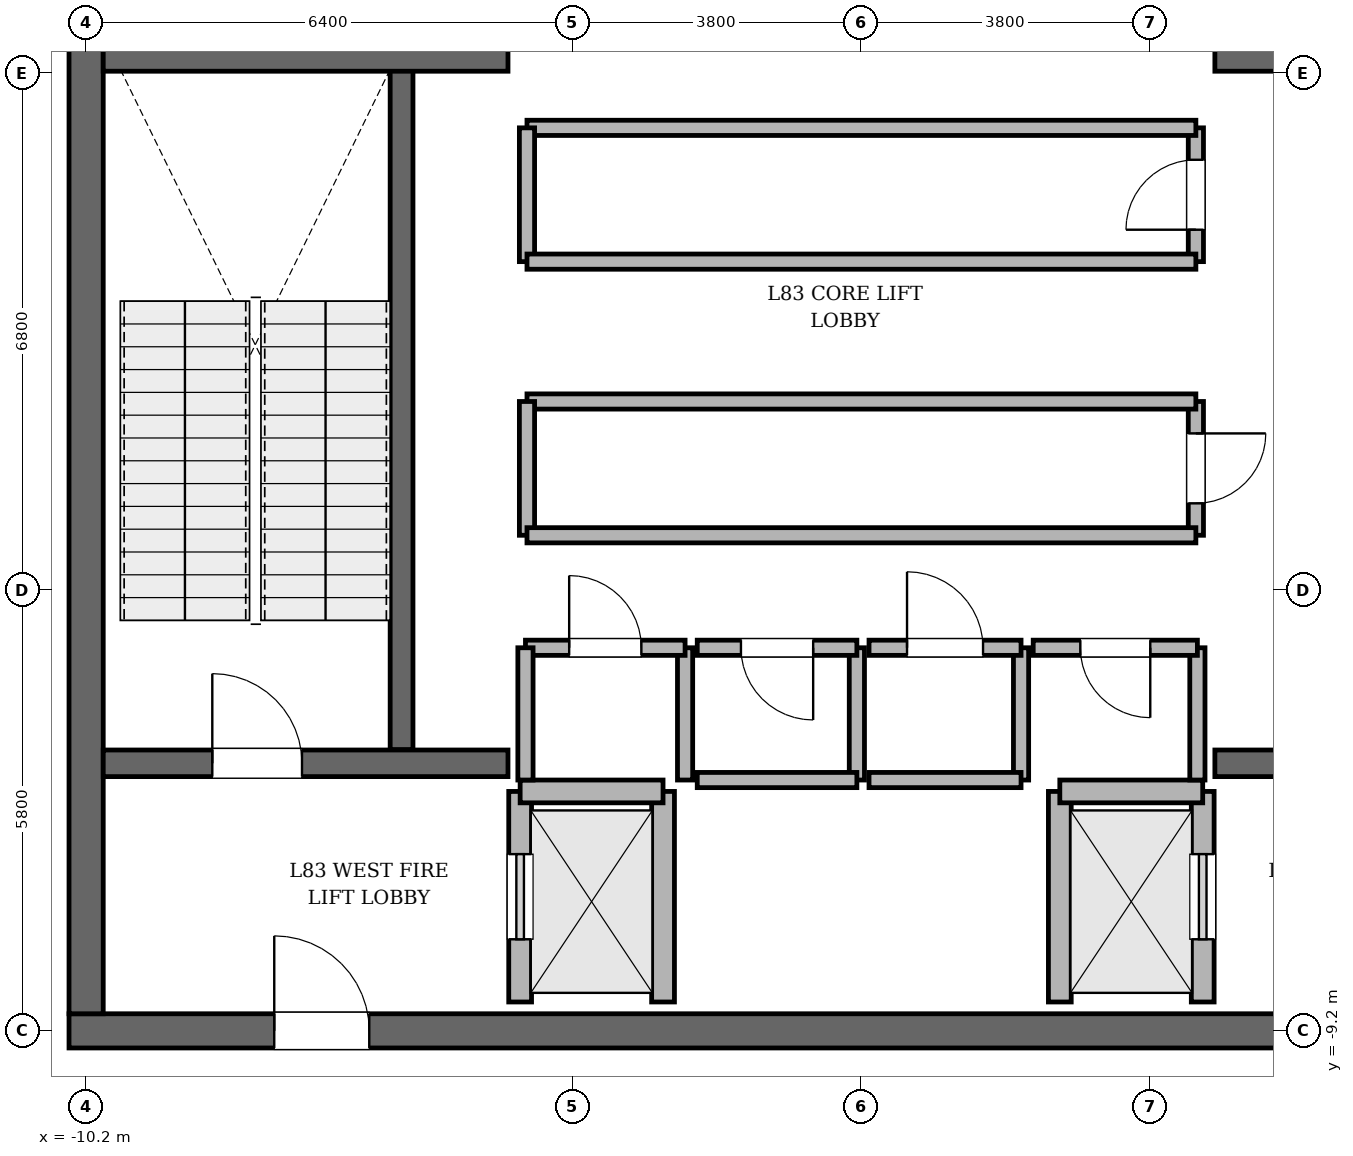
"""IFC4 building model, lengths in metres.
Left out: names, types, materials, properties, quantities, classifications, styles, units other than length and angle.
Written with IfcOpenShell. Run it as: python <this file> out.ifc"""

import sys

from ifc_helpers import new_model, si_unit, direction, frame, frame_2d, origin, place, context, subcontext, project, spatial, rectangle, extrude, element, fill, save


model = new_model("IFC4")
c1 = context("Model", 3, precision=1e-05, world=origin(), true_north=direction((0.0, 1.0)))
c2 = subcontext(c1, "Body", "Model", "MODEL_VIEW")
j1 = project(units=[si_unit("LENGTHUNIT", "METRE"), si_unit("PLANEANGLEUNIT", "RADIAN")], contexts=[c1])
p1 = place(None, origin())
s1 = spatial("IfcSite", under=j1, at=p1, CompositionType="ELEMENT")
p2 = place(p1, origin())
s2 = spatial("IfcBuilding", under=s1, at=p2, CompositionType="ELEMENT")
p3 = place(p2, frame((0.0, 0.0, 352.8)))
s3 = spatial("IfcBuildingStorey", under=s2, at=p3, CompositionType="ELEMENT", Elevation=352.8)
p4 = place(p3, frame((10.425, -9.2, 0.0), z_axis=(0.0, 0.0, 1.0), x_axis=(-1.0, 0.0, 0.0)))
e1 = element("IfcWall", 1, at=p4, inside=s3, PredefinedType="SHEAR", context=c2, shape_type="SweptSolid", body=[
    extrude(rectangle(XDim=20.85, YDim=0.45, at=frame_2d((10.425, 0.0))), origin(), (0.0, 0.0, 1.0), 4.5),
])
p5 = place(p4, frame((2.7, 0.0, 0.0)))
e2 = element("IfcOpeningElement", 2, at=p5, cuts=e1, PredefinedType="OPENING", context=c2, shape_type="SweptSolid", body=[
    extrude(rectangle(XDim=1.25, YDim=2.25, at=frame_2d((0.625, 1.125))), frame((0.0, 0.235, 0.0), z_axis=(0.0, -1.0, 0.0), x_axis=(1.0, 0.0, 0.0)), (0.0, 0.0, 1.0), 0.47),
])
p6 = place(p4, frame((16.9, 0.0, 0.0)))
e3 = element("IfcOpeningElement", 3, at=p6, cuts=e1, PredefinedType="OPENING", context=c2, shape_type="SweptSolid", body=[
    extrude(rectangle(XDim=1.25, YDim=2.25, at=frame_2d((0.625, 1.125))), frame((0.0, 0.235, 0.0), z_axis=(0.0, -1.0, 0.0), x_axis=(1.0, 0.0, 0.0)), (0.0, 0.0, 1.0), 0.47),
])
p7 = place(p3, frame((-10.2, -8.975, 0.0), z_axis=(0.0, 0.0, 1.0), x_axis=(0.0, 1.0, 0.0)))
e4 = element("IfcWall", 4, at=p7, inside=s3, PredefinedType="SHEAR", context=c2, shape_type="SweptSolid", body=[
    extrude(rectangle(XDim=17.95, YDim=0.45, at=frame_2d((8.975, 0.0))), origin(), (0.0, 0.0, 1.0), 4.5),
])
p8 = place(p7, frame((12.765, 0.0, 0.0)))
e5 = element("IfcOpeningElement", 5, at=p8, cuts=e4, PredefinedType="OPENING", context=c2, shape_type="SweptSolid", body=[
    extrude(rectangle(XDim=1.18, YDim=2.2, at=frame_2d((0.59, 1.1))), frame((0.0, 0.235, 0.0), z_axis=(0.0, -1.0, 0.0), x_axis=(1.0, 0.0, 0.0)), (0.0, 0.0, 1.0), 0.47),
])
p9 = place(p3, frame((-6.05, -5.5, 0.0), z_axis=(0.0, 0.0, 1.0), x_axis=(0.0, 1.0, 0.0)))
e6 = element("IfcWall", 6, at=p9, inside=s3, PredefinedType="SOLIDWALL", context=c2, shape_type="SweptSolid", body=[
    extrude(rectangle(XDim=8.95, YDim=0.3, at=frame_2d((4.475, 0.0))), origin(), (0.0, 0.0, 1.0), 4.5),
])
p10 = place(p3, frame((-9.975, -5.68, 0.0), z_axis=(0.0, 0.0, 1.0), x_axis=(1.0, 0.0, 0.0)))
e7 = element("IfcWall", 7, at=p10, inside=s3, PredefinedType="SOLIDWALL", context=c2, shape_type="SweptSolid", body=[
    extrude(rectangle(XDim=5.325, YDim=0.35, at=frame_2d((2.663, 0.0))), origin(), (0.0, 0.0, 1.0), 4.5),
])
p11 = place(p10, frame((1.435, 0.0, 0.0)))
e8 = element("IfcOpeningElement", 8, at=p11, cuts=e7, PredefinedType="OPENING", context=c2, shape_type="SweptSolid", body=[
    extrude(rectangle(XDim=1.18, YDim=2.2, at=frame_2d((0.59, 1.1))), frame((0.0, 0.185, 0.0), z_axis=(0.0, -1.0, 0.0), x_axis=(1.0, 0.0, 0.0)), (0.0, 0.0, 1.0), 0.37),
])
p12 = place(p3, frame((4.65, -5.68, 0.0), z_axis=(0.0, 0.0, 1.0), x_axis=(1.0, 0.0, 0.0)))
e9 = element("IfcWall", 9, at=p12, inside=s3, PredefinedType="SOLIDWALL", context=c2, shape_type="SweptSolid", body=[
    extrude(rectangle(XDim=5.325, YDim=0.35, at=frame_2d((2.663, 0.0))), origin(), (0.0, 0.0, 1.0), 4.5),
])
p13 = place(p12, frame((2.71, 0.0, 0.0)))
e10 = element("IfcOpeningElement", 10, at=p13, cuts=e9, PredefinedType="OPENING", context=c2, shape_type="SweptSolid", body=[
    extrude(rectangle(XDim=1.18, YDim=2.2, at=frame_2d((0.59, 1.1))), frame((0.0, 0.185, 0.0), z_axis=(0.0, -1.0, 0.0), x_axis=(1.0, 0.0, 0.0)), (0.0, 0.0, 1.0), 0.37),
])
for number, where, z_axis, x_axis in (
    (11, (-9.975, 3.6, 0.0), (0.0, 0.0, 1.0), (1.0, 0.0, 0.0)),
    (12, (4.65, 3.6, 0.0), (0.0, 0.0, 1.0), (1.0, 0.0, 0.0)),
):
    element("IfcWall", number, at=place(p3, frame(where, z_axis=z_axis, x_axis=x_axis)), inside=s3, PredefinedType="SOLIDWALL", context=c2, shape_type="SweptSolid", body=[
        extrude(rectangle(XDim=5.325, YDim=0.35, at=frame_2d((2.663, 0.0))), origin(), (0.0, 0.0, 1.0), 4.5),
    ])
p14 = place(p3, frame((-4.49, -8.82, 0.0), z_axis=(0.0, 0.0, 1.0), x_axis=(0.0, 1.0, 0.0)))
e13 = element("IfcWall", 13, at=p14, inside=s3, PredefinedType="SOLIDWALL", context=c2, shape_type="SweptSolid", body=[
    extrude(rectangle(XDim=2.77, YDim=0.3, at=frame_2d((1.385, 0.0))), origin(), (0.0, 0.0, 1.0), 4.28),
])
p15 = place(p14, frame((0.825, 0.0, 0.0)))
e14 = element("IfcOpeningElement", 14, at=p15, cuts=e13, PredefinedType="OPENING", context=c2, shape_type="SweptSolid", body=[
    extrude(rectangle(XDim=1.12, YDim=2.25, at=frame_2d((0.56, 1.125))), frame((0.0, 0.16, 0.0), z_axis=(0.0, -1.0, 0.0), x_axis=(1.0, 0.0, 0.0)), (0.0, 0.0, 1.0), 0.32),
])
p16 = place(p3, frame((-2.61, -8.82, 0.0), z_axis=(0.0, 0.0, 1.0), x_axis=(0.0, 1.0, 0.0)))
e15 = element("IfcWall", 15, at=p16, inside=s3, PredefinedType="SOLIDWALL", context=c2, shape_type="SweptSolid", body=[
    extrude(rectangle(XDim=2.77, YDim=0.3, at=frame_2d((1.385, 0.0))), origin(), (0.0, 0.0, 1.0), 4.28),
])
p17 = place(p3, frame((-4.49, -6.05, 0.0), z_axis=(0.0, 0.0, 1.0), x_axis=(1.0, 0.0, 0.0)))
e16 = element("IfcWall", 16, at=p17, inside=s3, PredefinedType="SOLIDWALL", context=c2, shape_type="SweptSolid", body=[
    extrude(rectangle(XDim=1.88, YDim=0.3, at=frame_2d((0.94, 0.0))), origin(), (0.0, 0.0, 1.0), 4.28),
])
p18 = place(p3, frame((4.49, -8.82, 0.0), z_axis=(0.0, 0.0, 1.0), x_axis=(0.0, 1.0, 0.0)))
e17 = element("IfcWall", 17, at=p18, inside=s3, PredefinedType="SOLIDWALL", context=c2, shape_type="SweptSolid", body=[
    extrude(rectangle(XDim=2.77, YDim=0.3, at=frame_2d((1.385, 0.0))), origin(), (0.0, 0.0, 1.0), 4.28),
])
p19 = place(p18, frame((0.825, 0.0, 0.0)))
e18 = element("IfcOpeningElement", 18, at=p19, cuts=e17, PredefinedType="OPENING", context=c2, shape_type="SweptSolid", body=[
    extrude(rectangle(XDim=1.12, YDim=2.25, at=frame_2d((0.56, 1.125))), frame((0.0, 0.16, 0.0), z_axis=(0.0, -1.0, 0.0), x_axis=(1.0, 0.0, 0.0)), (0.0, 0.0, 1.0), 0.32),
])
p20 = place(p3, frame((2.61, -8.82, 0.0), z_axis=(0.0, 0.0, 1.0), x_axis=(0.0, 1.0, 0.0)))
e19 = element("IfcWall", 19, at=p20, inside=s3, PredefinedType="SOLIDWALL", context=c2, shape_type="SweptSolid", body=[
    extrude(rectangle(XDim=2.77, YDim=0.3, at=frame_2d((1.385, 0.0))), origin(), (0.0, 0.0, 1.0), 4.28),
])
p21 = place(p3, frame((2.61, -6.05, 0.0), z_axis=(0.0, 0.0, 1.0), x_axis=(1.0, 0.0, 0.0)))
e20 = element("IfcWall", 20, at=p21, inside=s3, PredefinedType="SOLIDWALL", context=c2, shape_type="SweptSolid", body=[
    extrude(rectangle(XDim=1.88, YDim=0.3, at=frame_2d((0.94, 0.0))), origin(), (0.0, 0.0, 1.0), 4.28),
])
p22 = place(p3, frame((-2.32, -5.9, 0.0), z_axis=(0.0, 0.0, 1.0), x_axis=(0.0, 1.0, 0.0)))
e21 = element("IfcWall", 21, at=p22, inside=s3, PredefinedType="SOLIDWALL", context=c2, shape_type="SweptSolid", body=[
    extrude(rectangle(XDim=1.74, YDim=0.2, at=frame_2d((0.87, 0.0))), origin(), (0.0, 0.0, 1.0), 4.28),
])
p23 = place(p3, frame((-2.32, -4.16, 0.0), z_axis=(0.0, 0.0, 1.0), x_axis=(-1.0, 0.0, 0.0)))
e22 = element("IfcWall", 22, at=p23, inside=s3, PredefinedType="SOLIDWALL", context=c2, shape_type="SweptSolid", body=[
    extrude(rectangle(XDim=2.1, YDim=0.2, at=frame_2d((1.05, 0.0))), origin(), (0.0, 0.0, 1.0), 4.28),
])
p24 = place(p23, frame((0.575, 0.0, 0.0)))
e23 = element("IfcOpeningElement", 23, at=p24, cuts=e22, PredefinedType="OPENING", context=c2, shape_type="SweptSolid", body=[
    extrude(rectangle(XDim=0.95, YDim=2.15, at=frame_2d((0.475, 1.075))), frame((0.0, 0.11, 0.0), z_axis=(0.0, -1.0, 0.0), x_axis=(1.0, 0.0, 0.0)), (0.0, 0.0, 1.0), 0.22),
])
for number, where, z_axis, x_axis in (
    (24, (-4.42, -4.16, 0.0), (0.0, 0.0, 1.0), (0.0, -1.0, 0.0)),
    (25, (-0.06, -5.9, 0.0), (0.0, 0.0, 1.0), (0.0, 1.0, 0.0)),
):
    element("IfcWall", number, at=place(p3, frame(where, z_axis=z_axis, x_axis=x_axis)), inside=s3, PredefinedType="SOLIDWALL", context=c2, shape_type="SweptSolid", body=[
        extrude(rectangle(XDim=1.74, YDim=0.2, at=frame_2d((0.87, 0.0))), origin(), (0.0, 0.0, 1.0), 4.28),
    ])
p25 = place(p3, frame((-0.06, -4.16, 0.0), z_axis=(0.0, 0.0, 1.0), x_axis=(-1.0, 0.0, 0.0)))
e26 = element("IfcWall", 26, at=p25, inside=s3, PredefinedType="SOLIDWALL", context=c2, shape_type="SweptSolid", body=[
    extrude(rectangle(XDim=2.1, YDim=0.2, at=frame_2d((1.05, 0.0))), origin(), (0.0, 0.0, 1.0), 4.28),
])
p26 = place(p25, frame((0.575, 0.0, 0.0)))
e27 = element("IfcOpeningElement", 27, at=p26, cuts=e26, PredefinedType="OPENING", context=c2, shape_type="SweptSolid", body=[
    extrude(rectangle(XDim=0.95, YDim=2.15, at=frame_2d((0.475, 1.075))), frame((0.0, 0.11, 0.0), z_axis=(0.0, -1.0, 0.0), x_axis=(1.0, 0.0, 0.0)), (0.0, 0.0, 1.0), 0.22),
])
p27 = place(p3, frame((-2.16, -5.9, 0.0), z_axis=(0.0, 0.0, 1.0), x_axis=(1.0, 0.0, 0.0)))
e28 = element("IfcWall", 28, at=p27, inside=s3, PredefinedType="SOLIDWALL", context=c2, shape_type="SweptSolid", body=[
    extrude(rectangle(XDim=2.1, YDim=0.2, at=frame_2d((1.05, 0.0))), origin(), (0.0, 0.0, 1.0), 4.28),
])
p28 = place(p3, frame((2.1, -5.9, 0.0), z_axis=(0.0, 0.0, 1.0), x_axis=(0.0, 1.0, 0.0)))
e29 = element("IfcWall", 29, at=p28, inside=s3, PredefinedType="SOLIDWALL", context=c2, shape_type="SweptSolid", body=[
    extrude(rectangle(XDim=1.74, YDim=0.2, at=frame_2d((0.87, 0.0))), origin(), (0.0, 0.0, 1.0), 4.28),
])
p29 = place(p3, frame((2.1, -4.16, 0.0), z_axis=(0.0, 0.0, 1.0), x_axis=(-1.0, 0.0, 0.0)))
e30 = element("IfcWall", 30, at=p29, inside=s3, PredefinedType="SOLIDWALL", context=c2, shape_type="SweptSolid", body=[
    extrude(rectangle(XDim=2.0, YDim=0.2, at=frame_2d((1.0, 0.0))), origin(), (0.0, 0.0, 1.0), 4.28),
])
p30 = place(p29, frame((0.5, 0.0, 0.0)))
e31 = element("IfcOpeningElement", 31, at=p30, cuts=e30, PredefinedType="OPENING", context=c2, shape_type="SweptSolid", body=[
    extrude(rectangle(XDim=1.0, YDim=2.15, at=frame_2d((0.5, 1.075))), frame((0.0, 0.11, 0.0), z_axis=(0.0, -1.0, 0.0), x_axis=(1.0, 0.0, 0.0)), (0.0, 0.0, 1.0), 0.22),
])
p31 = place(p3, frame((0.1, -5.9, 0.0), z_axis=(0.0, 0.0, 1.0), x_axis=(1.0, 0.0, 0.0)))
e32 = element("IfcWall", 32, at=p31, inside=s3, PredefinedType="SOLIDWALL", context=c2, shape_type="SweptSolid", body=[
    extrude(rectangle(XDim=2.0, YDim=0.2, at=frame_2d((1.0, 0.0))), origin(), (0.0, 0.0, 1.0), 4.28),
])
p32 = place(p3, frame((4.42, -5.9, 0.0), z_axis=(0.0, 0.0, 1.0), x_axis=(0.0, 1.0, 0.0)))
e33 = element("IfcWall", 33, at=p32, inside=s3, PredefinedType="SOLIDWALL", context=c2, shape_type="SweptSolid", body=[
    extrude(rectangle(XDim=1.74, YDim=0.2, at=frame_2d((0.87, 0.0))), origin(), (0.0, 0.0, 1.0), 4.28),
])
p33 = place(p3, frame((4.42, -4.16, 0.0), z_axis=(0.0, 0.0, 1.0), x_axis=(-1.0, 0.0, 0.0)))
e34 = element("IfcWall", 34, at=p33, inside=s3, PredefinedType="SOLIDWALL", context=c2, shape_type="SweptSolid", body=[
    extrude(rectangle(XDim=2.16, YDim=0.2, at=frame_2d((1.08, 0.0))), origin(), (0.0, 0.0, 1.0), 4.28),
])
p34 = place(p33, frame((0.62, 0.0, 0.0)))
e35 = element("IfcOpeningElement", 35, at=p34, cuts=e34, PredefinedType="OPENING", context=c2, shape_type="SweptSolid", body=[
    extrude(rectangle(XDim=0.92, YDim=2.1, at=frame_2d((0.46, 1.05))), frame((0.0, 0.11, 0.0), z_axis=(0.0, -1.0, 0.0), x_axis=(1.0, 0.0, 0.0)), (0.0, 0.0, 1.0), 0.22),
])
p35 = place(p3, frame((4.4, -2.68, 0.0), z_axis=(0.0, 0.0, 1.0), x_axis=(0.0, 1.0, 0.0)))
e36 = element("IfcWall", 36, at=p35, inside=s3, PredefinedType="SOLIDWALL", context=c2, shape_type="SweptSolid", body=[
    extrude(rectangle(XDim=1.76, YDim=0.2, at=frame_2d((0.88, 0.0))), origin(), (0.0, 0.0, 1.0), 4.28),
])
p36 = place(p35, frame((0.42, 0.0, 0.0)))
e37 = element("IfcOpeningElement", 37, at=p36, cuts=e36, PredefinedType="OPENING", context=c2, shape_type="SweptSolid", body=[
    extrude(rectangle(XDim=0.92, YDim=2.1, at=frame_2d((0.46, 1.05))), frame((0.0, 0.11, 0.0), z_axis=(0.0, -1.0, 0.0), x_axis=(1.0, 0.0, 0.0)), (0.0, 0.0, 1.0), 0.22),
])
p37 = place(p3, frame((4.4, -0.92, 0.0), z_axis=(0.0, 0.0, 1.0), x_axis=(-1.0, 0.0, 0.0)))
e38 = element("IfcWall", 38, at=p37, inside=s3, PredefinedType="SOLIDWALL", context=c2, shape_type="SweptSolid", body=[
    extrude(rectangle(XDim=8.8, YDim=0.2, at=frame_2d((4.4, 0.0))), origin(), (0.0, 0.0, 1.0), 4.28),
])
p38 = place(p3, frame((-4.4, -0.92, 0.0), z_axis=(0.0, 0.0, 1.0), x_axis=(0.0, -1.0, 0.0)))
e39 = element("IfcWall", 39, at=p38, inside=s3, PredefinedType="SOLIDWALL", context=c2, shape_type="SweptSolid", body=[
    extrude(rectangle(XDim=1.76, YDim=0.2, at=frame_2d((0.88, 0.0))), origin(), (0.0, 0.0, 1.0), 4.28),
])
p39 = place(p3, frame((-4.4, -2.68, 0.0), z_axis=(0.0, 0.0, 1.0), x_axis=(1.0, 0.0, 0.0)))
e40 = element("IfcWall", 40, at=p39, inside=s3, PredefinedType="SOLIDWALL", context=c2, shape_type="SweptSolid", body=[
    extrude(rectangle(XDim=8.8, YDim=0.2, at=frame_2d((4.4, 0.0))), origin(), (0.0, 0.0, 1.0), 4.28),
])
p40 = place(p3, frame((4.4, 0.92, 0.0), z_axis=(0.0, 0.0, 1.0), x_axis=(0.0, 1.0, 0.0)))
e41 = element("IfcWall", 41, at=p40, inside=s3, PredefinedType="SOLIDWALL", context=c2, shape_type="SweptSolid", body=[
    extrude(rectangle(XDim=1.76, YDim=0.2, at=frame_2d((0.88, 0.0))), origin(), (0.0, 0.0, 1.0), 4.28),
])
p41 = place(p40, frame((0.42, 0.0, 0.0)))
e42 = element("IfcOpeningElement", 42, at=p41, cuts=e41, PredefinedType="OPENING", context=c2, shape_type="SweptSolid", body=[
    extrude(rectangle(XDim=0.92, YDim=2.1, at=frame_2d((0.46, 1.05))), frame((0.0, 0.11, 0.0), z_axis=(0.0, -1.0, 0.0), x_axis=(1.0, 0.0, 0.0)), (0.0, 0.0, 1.0), 0.22),
])
p42 = place(p3, frame((4.4, 2.68, 0.0), z_axis=(0.0, 0.0, 1.0), x_axis=(-1.0, 0.0, 0.0)))
e43 = element("IfcWall", 43, at=p42, inside=s3, PredefinedType="SOLIDWALL", context=c2, shape_type="SweptSolid", body=[
    extrude(rectangle(XDim=8.8, YDim=0.2, at=frame_2d((4.4, 0.0))), origin(), (0.0, 0.0, 1.0), 4.28),
])
p43 = place(p3, frame((-4.4, 2.68, 0.0), z_axis=(0.0, 0.0, 1.0), x_axis=(0.0, -1.0, 0.0)))
e44 = element("IfcWall", 44, at=p43, inside=s3, PredefinedType="SOLIDWALL", context=c2, shape_type="SweptSolid", body=[
    extrude(rectangle(XDim=1.76, YDim=0.2, at=frame_2d((0.88, 0.0))), origin(), (0.0, 0.0, 1.0), 4.28),
])
p44 = place(p3, frame((-4.4, 0.92, 0.0), z_axis=(0.0, 0.0, 1.0), x_axis=(1.0, 0.0, 0.0)))
e45 = element("IfcWall", 45, at=p44, inside=s3, PredefinedType="SOLIDWALL", context=c2, shape_type="SweptSolid", body=[
    extrude(rectangle(XDim=8.8, YDim=0.2, at=frame_2d((4.4, 0.0))), origin(), (0.0, 0.0, 1.0), 4.28),
])
p45 = place(p11, origin())
e46 = element("IfcDoor", 46, at=p45, inside=s3, OperationType="SINGLE_SWING_LEFT", PredefinedType="DOOR", context=c2, shape_type="SweptSolid", body=[
    extrude(rectangle(XDim=1.18, YDim=2.2, at=frame_2d((0.59, 1.1))), frame((0.0, 0.025, 0.0), z_axis=(0.0, -1.0, 0.0), x_axis=(1.0, 0.0, 0.0)), (0.0, 0.0, 1.0), 0.05),
])
fill(e8, e46)
p46 = place(p6, origin())
e47 = element("IfcDoor", 47, at=p46, inside=s3, OperationType="SINGLE_SWING_RIGHT", PredefinedType="DOOR", context=c2, shape_type="SweptSolid", body=[
    extrude(rectangle(XDim=1.25, YDim=2.25, at=frame_2d((0.625, 1.125))), frame((0.0, 0.025, 0.0), z_axis=(0.0, -1.0, 0.0), x_axis=(1.0, 0.0, 0.0)), (0.0, 0.0, 1.0), 0.05),
])
fill(e3, e47)
p47 = place(p15, origin())
e48 = element("IfcDoor", 48, at=p47, inside=s3, OperationType="SLIDING_TO_LEFT", PredefinedType="DOOR", context=c2, shape_type="SweptSolid", body=[
    extrude(rectangle(XDim=1.12, YDim=2.25, at=frame_2d((0.56, 1.125))), frame((0.0, 0.025, 0.0), z_axis=(0.0, -1.0, 0.0), x_axis=(1.0, 0.0, 0.0)), (0.0, 0.0, 1.0), 0.05),
])
fill(e14, e48)
p48 = place(p19, origin())
e49 = element("IfcDoor", 49, at=p48, inside=s3, OperationType="SLIDING_TO_RIGHT", PredefinedType="DOOR", context=c2, shape_type="SweptSolid", body=[
    extrude(rectangle(XDim=1.12, YDim=2.25, at=frame_2d((0.56, 1.125))), frame((0.0, 0.025, 0.0), z_axis=(0.0, -1.0, 0.0), x_axis=(1.0, 0.0, 0.0)), (0.0, 0.0, 1.0), 0.05),
])
fill(e18, e49)
p49 = place(p24, origin())
e50 = element("IfcDoor", 50, at=p49, inside=s3, OperationType="SINGLE_SWING_RIGHT", PredefinedType="DOOR", context=c2, shape_type="SweptSolid", body=[
    extrude(rectangle(XDim=0.95, YDim=2.15, at=frame_2d((0.475, 1.075))), frame((0.0, 0.025, 0.0), z_axis=(0.0, -1.0, 0.0), x_axis=(1.0, 0.0, 0.0)), (0.0, 0.0, 1.0), 0.05),
])
fill(e23, e50)
p50 = place(p26, origin())
e51 = element("IfcDoor", 51, at=p50, inside=s3, OperationType="SINGLE_SWING_LEFT", PredefinedType="DOOR", context=c2, shape_type="SweptSolid", body=[
    extrude(rectangle(XDim=0.95, YDim=2.15, at=frame_2d((0.475, 1.075))), frame((0.0, 0.025, 0.0), z_axis=(0.0, -1.0, 0.0), x_axis=(1.0, 0.0, 0.0)), (0.0, 0.0, 1.0), 0.05),
])
fill(e27, e51)
p51 = place(p30, origin())
e52 = element("IfcDoor", 52, at=p51, inside=s3, OperationType="SINGLE_SWING_RIGHT", PredefinedType="DOOR", context=c2, shape_type="SweptSolid", body=[
    extrude(rectangle(XDim=1.0, YDim=2.15, at=frame_2d((0.5, 1.075))), frame((0.0, 0.025, 0.0), z_axis=(0.0, -1.0, 0.0), x_axis=(1.0, 0.0, 0.0)), (0.0, 0.0, 1.0), 0.05),
])
fill(e31, e52)
p52 = place(p34, origin())
e53 = element("IfcDoor", 53, at=p52, inside=s3, OperationType="SINGLE_SWING_LEFT", PredefinedType="DOOR", context=c2, shape_type="SweptSolid", body=[
    extrude(rectangle(XDim=0.92, YDim=2.1, at=frame_2d((0.46, 1.05))), frame((0.0, 0.025, 0.0), z_axis=(0.0, -1.0, 0.0), x_axis=(1.0, 0.0, 0.0)), (0.0, 0.0, 1.0), 0.05),
])
fill(e35, e53)
p53 = place(p36, origin())
e54 = element("IfcDoor", 54, at=p53, inside=s3, OperationType="SINGLE_SWING_RIGHT", PredefinedType="DOOR", context=c2, shape_type="SweptSolid", body=[
    extrude(rectangle(XDim=0.92, YDim=2.1, at=frame_2d((0.46, 1.05))), frame((0.0, 0.025, 0.0), z_axis=(0.0, -1.0, 0.0), x_axis=(1.0, 0.0, 0.0)), (0.0, 0.0, 1.0), 0.05),
])
fill(e37, e54)
p54 = place(p41, origin())
e55 = element("IfcDoor", 55, at=p54, inside=s3, OperationType="SINGLE_SWING_LEFT", PredefinedType="DOOR", context=c2, shape_type="SweptSolid", body=[
    extrude(rectangle(XDim=0.92, YDim=2.1, at=frame_2d((0.46, 1.05))), frame((0.0, 0.025, 0.0), z_axis=(0.0, -1.0, 0.0), x_axis=(1.0, 0.0, 0.0)), (0.0, 0.0, 1.0), 0.05),
])
fill(e42, e55)
save(model, sys.argv[1])
